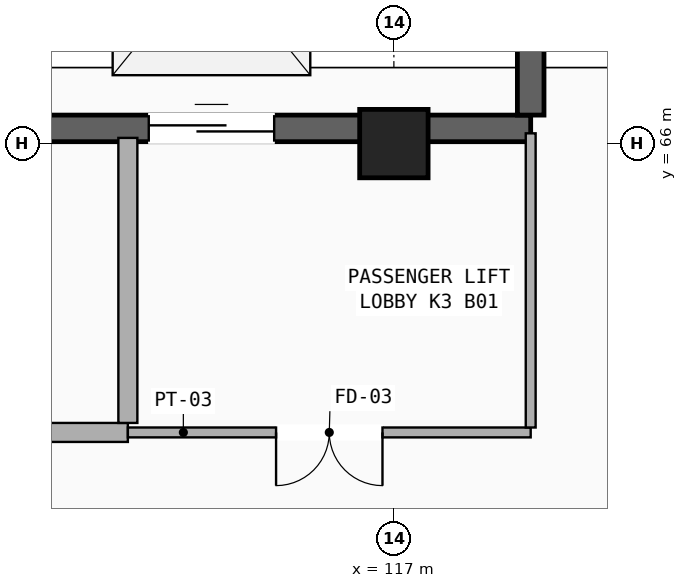
"""IFC4 building model, lengths in metres.
Left out: names, types, materials, properties, quantities, classifications, styles, units other than length and angle.
Written with IfcOpenShell. Run it as: python <this file> out.ifc"""

import sys

from ifc_helpers import new_model, si_unit, direction, frame, frame_2d, origin, origin_2d, place, context, subcontext, project, spatial, rectangle, extrude, element, fill, save


model = new_model("IFC4")
c1 = context("Model", 3, precision=1e-05, world=origin(), true_north=direction((0.0, 1.0)))
c2 = subcontext(c1, "Body", "Model", "MODEL_VIEW")
j1 = project(units=[si_unit("LENGTHUNIT", "METRE"), si_unit("PLANEANGLEUNIT", "RADIAN")], contexts=[c1])
p1 = place(None, origin())
s1 = spatial("IfcSite", under=j1, at=p1, CompositionType="ELEMENT")
p2 = place(p1, origin())
s2 = spatial("IfcBuilding", under=s1, at=p2, CompositionType="ELEMENT")
p3 = place(p2, frame((0.0, 0.0, -5.1)))
s3 = spatial("IfcBuildingStorey", under=s2, at=p3, CompositionType="ELEMENT", Elevation=-5.1)
p4 = place(p3, frame((117.0, 66.0, 0.0), z_axis=(0.0, 0.0, 1.0), x_axis=(1.0, 0.0, 0.0)))
e1 = element("IfcColumn", 1, at=p4, inside=s3, PredefinedType="COLUMN", context=c2, shape_type="SweptSolid", body=[
    extrude(rectangle(XDim=0.9, YDim=0.9, at=origin_2d()), origin(), (0.0, 0.0, 1.0), 5.1),
])
p5 = place(p3, frame((108.5, 66.2, 0.0), z_axis=(0.0, 0.0, 1.0), x_axis=(1.0, 0.0, 0.0)))
e2 = element("IfcWall", 2, at=p5, inside=s3, PredefinedType="SHEAR", context=c2, shape_type="SweptSolid", body=[
    extrude(rectangle(XDim=10.3, YDim=0.35, at=frame_2d((5.15, 0.0))), origin(), (0.0, 0.0, 1.0), 5.1),
])
p6 = place(p5, frame((0.45, 0.0, 0.0)))
e3 = element("IfcOpeningElement", 3, at=p6, cuts=e2, PredefinedType="OPENING", context=c2, shape_type="SweptSolid", body=[
    extrude(rectangle(XDim=1.1, YDim=2.2, at=frame_2d((0.55, 1.1))), frame((0.0, 0.185, 0.0), z_axis=(0.0, -1.0, 0.0), x_axis=(1.0, 0.0, 0.0)), (0.0, 0.0, 1.0), 0.37),
])
p7 = place(p5, frame((2.09, 0.0, 0.0)))
e4 = element("IfcOpeningElement", 4, at=p7, cuts=e2, PredefinedType="OPENING", context=c2, shape_type="SweptSolid", body=[
    extrude(rectangle(XDim=1.22, YDim=2.2, at=frame_2d((0.61, 1.1))), frame((0.0, 0.185, 0.0), z_axis=(0.0, -1.0, 0.0), x_axis=(1.0, 0.0, 0.0)), (0.0, 0.0, 1.0), 0.37),
])
p8 = place(p5, frame((5.275, 0.0, 0.0)))
e5 = element("IfcOpeningElement", 5, at=p8, cuts=e2, PredefinedType="OPENING", context=c2, shape_type="SweptSolid", body=[
    extrude(rectangle(XDim=1.65, YDim=2.34, at=frame_2d((0.825, 1.17))), frame((0.0, 0.185, 0.0), z_axis=(0.0, -1.0, 0.0), x_axis=(1.0, 0.0, 0.0)), (0.0, 0.0, 1.0), 0.37),
])
p9 = place(p3, frame((118.8, 66.375, 0.0), z_axis=(0.0, 0.0, 1.0), x_axis=(0.0, 1.0, 0.0)))
e6 = element("IfcWall", 6, at=p9, inside=s3, PredefinedType="SHEAR", context=c2, shape_type="SweptSolid", body=[
    extrude(rectangle(XDim=8.25, YDim=0.35, at=frame_2d((4.125, 0.0))), origin(), (0.0, 0.0, 1.0), 5.1),
])
p10 = place(p3, frame((108.5, 62.2, 0.0), z_axis=(0.0, 0.0, 1.0), x_axis=(1.0, 0.0, 0.0)))
e7 = element("IfcWall", 7, at=p10, inside=s3, PredefinedType="PARTITIONING", context=c2, shape_type="SweptSolid", body=[
    extrude(rectangle(XDim=5.0, YDim=0.25, at=frame_2d((2.5, 0.0))), origin(), (0.0, 0.0, 1.0), 4.78),
])
p11 = place(p10, frame((1.95, 0.0, 0.0)))
e8 = element("IfcOpeningElement", 8, at=p11, cuts=e7, PredefinedType="OPENING", context=c2, shape_type="SweptSolid", body=[
    extrude(rectangle(XDim=1.1, YDim=2.2, at=frame_2d((0.55, 1.1))), frame((0.0, 0.135, 0.0), z_axis=(0.0, -1.0, 0.0), x_axis=(1.0, 0.0, 0.0)), (0.0, 0.0, 1.0), 0.27),
])
p12 = place(p3, frame((113.5, 62.325, 0.0), z_axis=(0.0, 0.0, 1.0), x_axis=(0.0, 1.0, 0.0)))
e9 = element("IfcWall", 9, at=p12, inside=s3, PredefinedType="PARTITIONING", context=c2, shape_type="SweptSolid", body=[
    extrude(rectangle(XDim=3.75, YDim=0.25, at=frame_2d((1.875, 0.0))), origin(), (0.0, 0.0, 1.0), 4.01),
])
p13 = place(p3, frame((113.5, 62.2, 0.0), z_axis=(0.0, 0.0, 1.0), x_axis=(1.0, 0.0, 0.0)))
e10 = element("IfcWall", 10, at=p13, inside=s3, PredefinedType="PARTITIONING", context=c2, shape_type="SweptSolid", body=[
    extrude(rectangle(XDim=5.3, YDim=0.13, at=frame_2d((2.65, 0.0))), origin(), (0.0, 0.0, 1.0), 4.78),
])
p14 = place(p13, frame((1.95, 0.0, 0.0)))
e11 = element("IfcOpeningElement", 11, at=p14, cuts=e10, PredefinedType="OPENING", context=c2, shape_type="SweptSolid", body=[
    extrude(rectangle(XDim=1.4, YDim=2.2, at=frame_2d((0.7, 1.1))), frame((0.0, 0.075, 0.0), z_axis=(0.0, -1.0, 0.0), x_axis=(1.0, 0.0, 0.0)), (0.0, 0.0, 1.0), 0.15),
])
p15 = place(p3, frame((118.8, 62.265, 0.0), z_axis=(0.0, 0.0, 1.0), x_axis=(0.0, 1.0, 0.0)))
e12 = element("IfcWall", 12, at=p15, inside=s3, PredefinedType="PARTITIONING", context=c2, shape_type="SweptSolid", body=[
    extrude(rectangle(XDim=3.87, YDim=0.13, at=frame_2d((1.935, 0.0))), origin(), (0.0, 0.0, 1.0), 4.01),
])
p16 = place(p8, origin())
e13 = element("IfcDoor", 13, at=p16, inside=s3, OperationType="SLIDING_TO_LEFT", PredefinedType="DOOR", context=c2, shape_type="SweptSolid", body=[
    extrude(rectangle(XDim=1.65, YDim=2.34, at=frame_2d((0.825, 1.17))), frame((0.0, 0.025, 0.0), z_axis=(0.0, -1.0, 0.0), x_axis=(1.0, 0.0, 0.0)), (0.0, 0.0, 1.0), 0.05),
])
fill(e5, e13)
p17 = place(p14, frame((1.4, 0.0, 0.0), z_axis=(0.0, 0.0, 1.0), x_axis=(-1.0, 0.0, 0.0)))
e14 = element("IfcDoor", 14, at=p17, inside=s3, OperationType="DOUBLE_DOOR_SINGLE_SWING", PredefinedType="DOOR", context=c2, shape_type="SweptSolid", body=[
    extrude(rectangle(XDim=1.4, YDim=2.2, at=frame_2d((0.7, 1.1))), frame((0.0, 0.025, 0.0), z_axis=(0.0, -1.0, 0.0), x_axis=(1.0, 0.0, 0.0)), (0.0, 0.0, 1.0), 0.05),
])
fill(e11, e14)
save(model, sys.argv[1])
